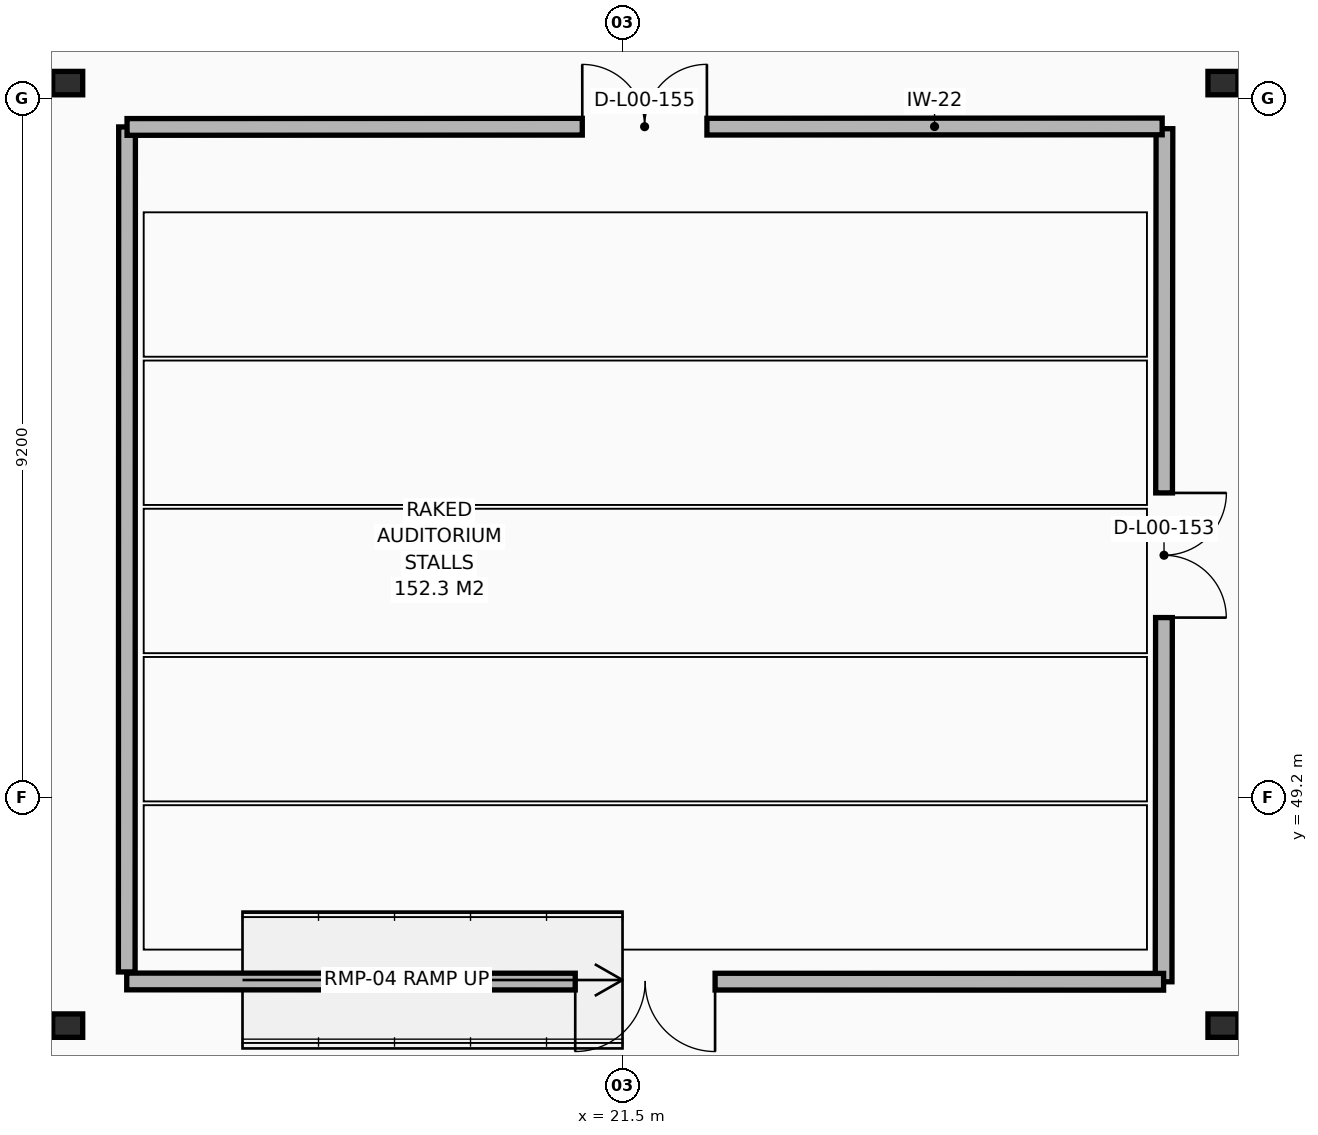
"""IFC4 building model, lengths in metres.
Left out: names, types, materials, properties, quantities, classifications, styles, units other than length and angle.
Written with IfcOpenShell. Run it as: python <this file> out.ifc"""

import sys

from ifc_helpers import new_model, si_unit, direction, frame, frame_2d, origin, origin_2d, place, context, subcontext, project, spatial, rectangle, i_section, extrude, element, fill, save


model = new_model("IFC4")
c1 = context("Model", 3, precision=1e-05, world=origin(), true_north=direction((0.0, 1.0)))
c2 = subcontext(c1, "Body", "Model", "MODEL_VIEW")
j1 = project(units=[si_unit("LENGTHUNIT", "METRE"), si_unit("PLANEANGLEUNIT", "RADIAN")], contexts=[c1])
p1 = place(None, origin())
s1 = spatial("IfcSite", under=j1, at=p1, CompositionType="ELEMENT")
p2 = place(p1, origin())
s2 = spatial("IfcBuilding", under=s1, at=p2, CompositionType="ELEMENT")
p3 = place(p2, origin())
s3 = spatial("IfcBuildingStorey", under=s2, at=p3, CompositionType="ELEMENT", Elevation=0.0)
for number, where, z_axis, x_axis in (
    (1, (14.2, 46.2, 0.0), (0.0, 0.0, 1.0), (1.0, 0.0, 0.0)),
    (2, (29.4, 46.2, 0.0), (0.0, 0.0, 1.0), (1.0, 0.0, 0.0)),
    (3, (29.4, 58.6, 0.0), (0.0, 0.0, 1.0), (1.0, 0.0, 0.0)),
    (4, (14.2, 58.6, 0.0), (0.0, 0.0, 1.0), (1.0, 0.0, 0.0)),
):
    element("IfcColumn", number, at=place(p3, frame(where, z_axis=z_axis, x_axis=x_axis)), inside=s3, PredefinedType="COLUMN", context=c2, shape_type="SweptSolid", body=[
        extrude(i_section(OverallWidth=0.308, OverallDepth=0.395, WebThickness=0.021, FlangeThickness=0.04, FilletRadius=0.027, at=origin_2d()), origin(), (0.0, 0.0, 1.0), 5.1),
    ])
p4 = place(p3, frame((28.63, 58.0, 0.0), z_axis=(0.0, 0.0, 1.0), x_axis=(-0.000978898813, -0.999999520878, 0.0)))
e5 = element("IfcWall", 5, at=p4, inside=s3, PredefinedType="PARTITIONING", context=c2, shape_type="SweptSolid", body=[
    extrude(rectangle(XDim=11.223, YDim=0.22, at=frame_2d((5.612, 0.0))), origin(), (0.0, 0.0, 1.0), 4.21),
])
p5 = place(p4, frame((4.792, 0.0, 0.0)))
e6 = element("IfcOpeningElement", 6, at=p5, cuts=e5, PredefinedType="OPENING", context=c2, shape_type="SweptSolid", body=[
    extrude(rectangle(XDim=1.64, YDim=2.2, at=frame_2d((0.82, 1.1))), frame((0.0, 0.12, 0.0), z_axis=(0.0, -1.0, 0.0), x_axis=(1.0, 0.0, 0.0)), (0.0, 0.0, 1.0), 0.24),
])
p6 = place(p3, frame((28.619, 46.777, 0.0), z_axis=(0.0, 0.0, 1.0), x_axis=(-0.999999953721, 0.00030423421, 0.0)))
e7 = element("IfcWall", 7, at=p6, inside=s3, PredefinedType="PARTITIONING", context=c2, shape_type="SweptSolid", body=[
    extrude(rectangle(XDim=13.642, YDim=0.22, at=frame_2d((6.821, 0.0))), origin(), (0.0, 0.0, 1.0), 4.21),
])
p7 = place(p6, frame((5.901, 0.0, 0.0)))
e8 = element("IfcOpeningElement", 8, at=p7, cuts=e7, PredefinedType="OPENING", context=c2, shape_type="SweptSolid", body=[
    extrude(rectangle(XDim=1.84, YDim=2.22, at=frame_2d((0.92, 1.11))), frame((0.0, 0.12, 0.0), z_axis=(0.0, -1.0, 0.0), x_axis=(1.0, 0.0, 0.0)), (0.0, 0.0, 1.0), 0.24),
])
p8 = place(p3, frame((14.977, 46.906, 0.0), z_axis=(0.0, 0.0, 1.0), x_axis=(0.000373330965, 0.999999930312, 0.0)))
e9 = element("IfcWall", 9, at=p8, inside=s3, PredefinedType="PARTITIONING", context=c2, shape_type="SweptSolid", body=[
    extrude(rectangle(XDim=11.117, YDim=0.22, at=frame_2d((5.559, 0.0))), origin(), (0.0, 0.0, 1.0), 4.21),
])
p9 = place(p3, frame((14.981, 58.023, 0.0), z_axis=(0.0, 0.0, 1.0), x_axis=(0.99999987403, 0.000501935976, 0.0)))
e10 = element("IfcWall", 10, at=p9, inside=s3, PredefinedType="PARTITIONING", context=c2, shape_type="SweptSolid", body=[
    extrude(rectangle(XDim=13.619, YDim=0.22, at=frame_2d((6.81, 0.0))), origin(), (0.0, 0.0, 1.0), 4.21),
])
p10 = place(p9, frame((5.99, 0.0, 0.0)))
e11 = element("IfcOpeningElement", 11, at=p10, cuts=e10, PredefinedType="OPENING", context=c2, shape_type="SweptSolid", body=[
    extrude(rectangle(XDim=1.64, YDim=2.2, at=frame_2d((0.82, 1.1))), frame((0.0, 0.12, 0.0), z_axis=(0.0, -1.0, 0.0), x_axis=(1.0, 0.0, 0.0)), (0.0, 0.0, 1.0), 0.24),
])
p11 = place(p5, origin())
e12 = element("IfcDoor", 12, at=p11, inside=s3, OperationType="DOUBLE_DOOR_SINGLE_SWING", PredefinedType="DOOR", context=c2, shape_type="SweptSolid", body=[
    extrude(rectangle(XDim=1.64, YDim=2.2, at=frame_2d((0.82, 1.1))), frame((0.0, 0.025, 0.0), z_axis=(0.0, -1.0, 0.0), x_axis=(1.0, 0.0, 0.0)), (0.0, 0.0, 1.0), 0.05),
])
fill(e6, e12)
p12 = place(p7, origin())
e13 = element("IfcDoor", 13, at=p12, inside=s3, OperationType="DOUBLE_DOOR_SINGLE_SWING", PredefinedType="DOOR", context=c2, shape_type="SweptSolid", body=[
    extrude(rectangle(XDim=1.84, YDim=2.22, at=frame_2d((0.92, 1.11))), frame((0.0, 0.025, 0.0), z_axis=(0.0, -1.0, 0.0), x_axis=(1.0, 0.0, 0.0)), (0.0, 0.0, 1.0), 0.05),
])
fill(e8, e13)
p13 = place(p10, origin())
e14 = element("IfcDoor", 14, at=p13, inside=s3, OperationType="DOUBLE_DOOR_SINGLE_SWING", PredefinedType="DOOR", context=c2, shape_type="SweptSolid", body=[
    extrude(rectangle(XDim=1.64, YDim=2.2, at=frame_2d((0.82, 1.1))), frame((0.0, 0.025, 0.0), z_axis=(0.0, -1.0, 0.0), x_axis=(1.0, 0.0, 0.0)), (0.0, 0.0, 1.0), 0.05),
])
fill(e11, e14)
save(model, sys.argv[1])
